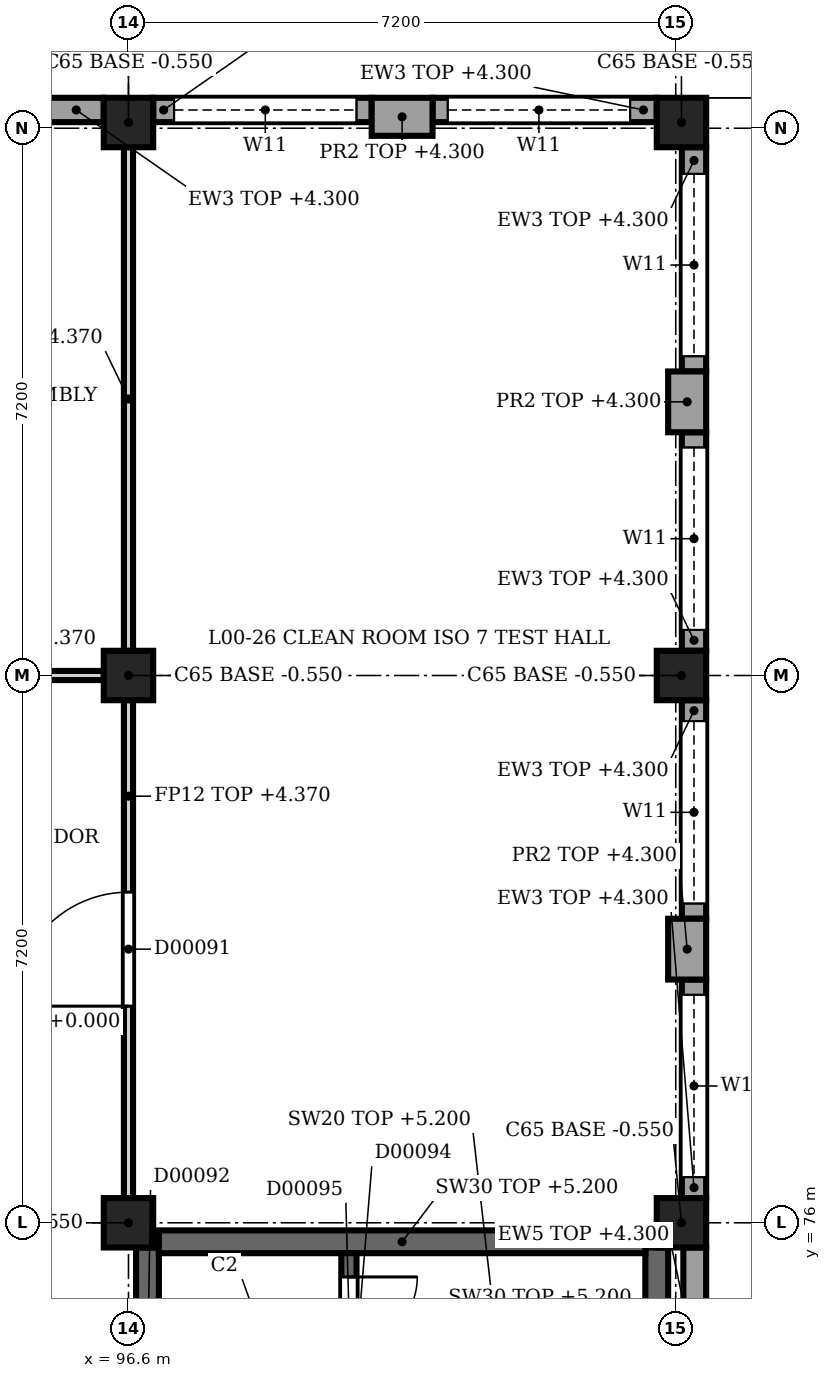
"""IFC4 building model, lengths in metres.
Left out: names, types, materials, properties, quantities, classifications, styles, units other than length and angle.
Written with IfcOpenShell. Run it as: python <this file> out.ifc"""

import sys

from ifc_helpers import new_model, si_unit, direction, frame, frame_2d, origin, origin_2d, place, context, subcontext, project, spatial, rectangle, extrude, element, fill, save


model = new_model("IFC4")
c1 = context("Model", 3, precision=1e-05, world=origin(), true_north=direction((0.0, 1.0)))
c2 = subcontext(c1, "Body", "Model", "MODEL_VIEW")
j1 = project(units=[si_unit("LENGTHUNIT", "METRE"), si_unit("PLANEANGLEUNIT", "RADIAN")], contexts=[c1])
p1 = place(None, origin())
s1 = spatial("IfcSite", under=j1, at=p1, CompositionType="ELEMENT")
p2 = place(p1, origin())
s2 = spatial("IfcBuilding", under=s1, at=p2, CompositionType="ELEMENT")
p3 = place(p2, origin())
s3 = spatial("IfcBuildingStorey", under=s2, at=p3, CompositionType="ELEMENT", Elevation=0.0)
for number, where, z_axis, x_axis in (
    (1, (96.6, 76.0, -0.55), (0.0, 0.0, 1.0), (1.0, 0.0, 0.0)),
    (2, (96.6, 83.2, -0.55), (0.0, 0.0, 1.0), (1.0, 0.0, 0.0)),
    (3, (96.6, 90.475, -0.55), (0.0, 0.0, 1.0), (1.0, 0.0, 0.0)),
    (4, (103.875, 76.0, -0.55), (0.0, 0.0, 1.0), (1.0, 0.0, 0.0)),
    (5, (103.875, 83.2, -0.55), (0.0, 0.0, 1.0), (1.0, 0.0, 0.0)),
    (6, (103.875, 90.475, -0.55), (0.0, 0.0, 1.0), (1.0, 0.0, 0.0)),
):
    element("IfcColumn", number, at=place(p3, frame(where, z_axis=z_axis, x_axis=x_axis)), inside=s3, PredefinedType="COLUMN", context=c2, shape_type="SweptSolid", body=[
        extrude(rectangle(XDim=0.65, YDim=0.65, at=origin_2d()), origin(), (0.0, 0.0, 1.0), 5.95),
    ])
p4 = place(p3, frame((99.8, 90.55, 0.0), z_axis=(0.0, 0.0, 1.0), x_axis=(1.0, 0.0, 0.0)))
e7 = element("IfcWall", 7, at=p4, inside=s3, PredefinedType="SOLIDWALL", context=c2, shape_type="SweptSolid", body=[
    extrude(rectangle(XDim=0.8, YDim=0.5, at=frame_2d((0.4, 0.0))), origin(), (0.0, 0.0, 1.0), 4.3),
])
p5 = place(p3, frame((93.4, 90.64, 0.0), z_axis=(0.0, 0.0, 1.0), x_axis=(1.0, 0.0, 0.0)))
e8 = element("IfcWall", 8, at=p5, inside=s3, PredefinedType="SOLIDWALL", context=c2, shape_type="SweptSolid", body=[
    extrude(rectangle(XDim=2.875, YDim=0.32, at=frame_2d((1.438, 0.0))), origin(), (0.0, 0.0, 1.0), 4.3),
])
p6 = place(p5, frame((0.65, 0.0, 0.0)))
e9 = element("IfcOpeningElement", 9, at=p6, cuts=e8, PredefinedType="OPENING", context=c2, shape_type="SweptSolid", body=[
    extrude(rectangle(XDim=1.5, YDim=2.3, at=frame_2d((0.75, 1.15))), frame((0.0, 0.17, 0.0), z_axis=(0.0, -1.0, 0.0), x_axis=(1.0, 0.0, 0.0)), (0.0, 0.0, 1.0), 0.34),
])
p7 = place(p3, frame((96.925, 90.64, 0.0), z_axis=(0.0, 0.0, 1.0), x_axis=(1.0, 0.0, 0.0)))
e10 = element("IfcWall", 10, at=p7, inside=s3, PredefinedType="SOLIDWALL", context=c2, shape_type="SweptSolid", body=[
    extrude(rectangle(XDim=2.875, YDim=0.32, at=frame_2d((1.438, 0.0))), origin(), (0.0, 0.0, 1.0), 4.3),
])
p8 = place(p7, frame((0.275, 0.0, 2.2)))
e11 = element("IfcOpeningElement", 11, at=p8, cuts=e10, PredefinedType="OPENING", context=c2, shape_type="SweptSolid", body=[
    extrude(rectangle(XDim=2.4, YDim=0.9, at=frame_2d((1.2, 0.45))), frame((0.0, 0.17, 0.0), z_axis=(0.0, -1.0, 0.0), x_axis=(1.0, 0.0, 0.0)), (0.0, 0.0, 1.0), 0.34),
])
p9 = place(p3, frame((100.6, 90.64, 0.0), z_axis=(0.0, 0.0, 1.0), x_axis=(1.0, 0.0, 0.0)))
e12 = element("IfcWall", 12, at=p9, inside=s3, PredefinedType="SOLIDWALL", context=c2, shape_type="SweptSolid", body=[
    extrude(rectangle(XDim=2.95, YDim=0.32, at=frame_2d((1.475, 0.0))), origin(), (0.0, 0.0, 1.0), 4.3),
])
p10 = place(p9, frame((0.2, 0.0, 2.2)))
e13 = element("IfcOpeningElement", 13, at=p10, cuts=e12, PredefinedType="OPENING", context=c2, shape_type="SweptSolid", body=[
    extrude(rectangle(XDim=2.4, YDim=0.9, at=frame_2d((1.2, 0.45))), frame((0.0, 0.17, 0.0), z_axis=(0.0, -1.0, 0.0), x_axis=(1.0, 0.0, 0.0)), (0.0, 0.0, 1.0), 0.34),
])
for number, where, z_axis, x_axis in (
    (14, (103.95, 87.2, 0.0), (0.0, 0.0, 1.0), (0.0, -1.0, 0.0)),
    (15, (103.95, 80.0, 0.0), (0.0, 0.0, 1.0), (0.0, -1.0, 0.0)),
):
    element("IfcWall", number, at=place(p3, frame(where, z_axis=z_axis, x_axis=x_axis)), inside=s3, PredefinedType="SOLIDWALL", context=c2, shape_type="SweptSolid", body=[
        extrude(rectangle(XDim=0.8, YDim=0.5, at=frame_2d((0.4, 0.0))), origin(), (0.0, 0.0, 1.0), 4.3),
    ])
p11 = place(p3, frame((104.04, 90.15, 0.0), z_axis=(0.0, 0.0, 1.0), x_axis=(0.0, -1.0, 0.0)))
e16 = element("IfcWall", 16, at=p11, inside=s3, PredefinedType="SOLIDWALL", context=c2, shape_type="SweptSolid", body=[
    extrude(rectangle(XDim=2.95, YDim=0.32, at=frame_2d((1.475, 0.0))), origin(), (0.0, 0.0, 1.0), 4.3),
])
p12 = place(p11, frame((0.35, 0.0, 2.2)))
e17 = element("IfcOpeningElement", 17, at=p12, cuts=e16, PredefinedType="OPENING", context=c2, shape_type="SweptSolid", body=[
    extrude(rectangle(XDim=2.4, YDim=0.9, at=frame_2d((1.2, 0.45))), frame((0.0, 0.17, 0.0), z_axis=(0.0, -1.0, 0.0), x_axis=(1.0, 0.0, 0.0)), (0.0, 0.0, 1.0), 0.34),
])
p13 = place(p3, frame((104.04, 86.4, 0.0), z_axis=(0.0, 0.0, 1.0), x_axis=(0.0, -1.0, 0.0)))
e18 = element("IfcWall", 18, at=p13, inside=s3, PredefinedType="SOLIDWALL", context=c2, shape_type="SweptSolid", body=[
    extrude(rectangle(XDim=2.875, YDim=0.32, at=frame_2d((1.438, 0.0))), origin(), (0.0, 0.0, 1.0), 4.3),
])
p14 = place(p13, frame((0.2, 0.0, 2.2)))
e19 = element("IfcOpeningElement", 19, at=p14, cuts=e18, PredefinedType="OPENING", context=c2, shape_type="SweptSolid", body=[
    extrude(rectangle(XDim=2.4, YDim=0.9, at=frame_2d((1.2, 0.45))), frame((0.0, 0.17, 0.0), z_axis=(0.0, -1.0, 0.0), x_axis=(1.0, 0.0, 0.0)), (0.0, 0.0, 1.0), 0.34),
])
p15 = place(p3, frame((104.04, 82.875, 0.0), z_axis=(0.0, 0.0, 1.0), x_axis=(0.0, -1.0, 0.0)))
e20 = element("IfcWall", 20, at=p15, inside=s3, PredefinedType="SOLIDWALL", context=c2, shape_type="SweptSolid", body=[
    extrude(rectangle(XDim=2.875, YDim=0.32, at=frame_2d((1.438, 0.0))), origin(), (0.0, 0.0, 1.0), 4.3),
])
p16 = place(p15, frame((0.275, 0.0, 2.2)))
e21 = element("IfcOpeningElement", 21, at=p16, cuts=e20, PredefinedType="OPENING", context=c2, shape_type="SweptSolid", body=[
    extrude(rectangle(XDim=2.4, YDim=0.9, at=frame_2d((1.2, 0.45))), frame((0.0, 0.17, 0.0), z_axis=(0.0, -1.0, 0.0), x_axis=(1.0, 0.0, 0.0)), (0.0, 0.0, 1.0), 0.34),
])
p17 = place(p3, frame((104.04, 79.2, 0.0), z_axis=(0.0, 0.0, 1.0), x_axis=(0.0, -1.0, 0.0)))
e22 = element("IfcWall", 22, at=p17, inside=s3, PredefinedType="SOLIDWALL", context=c2, shape_type="SweptSolid", body=[
    extrude(rectangle(XDim=2.875, YDim=0.32, at=frame_2d((1.438, 0.0))), origin(), (0.0, 0.0, 1.0), 4.3),
])
p18 = place(p17, frame((0.2, 0.0, 2.2)))
e23 = element("IfcOpeningElement", 23, at=p18, cuts=e22, PredefinedType="OPENING", context=c2, shape_type="SweptSolid", body=[
    extrude(rectangle(XDim=2.4, YDim=0.9, at=frame_2d((1.2, 0.45))), frame((0.0, 0.17, 0.0), z_axis=(0.0, -1.0, 0.0), x_axis=(1.0, 0.0, 0.0)), (0.0, 0.0, 1.0), 0.34),
])
p19 = place(p3, frame((104.05, 75.675, 0.0), z_axis=(0.0, 0.0, 1.0), x_axis=(0.0, -1.0, 0.0)))
e24 = element("IfcWall", 24, at=p19, inside=s3, PredefinedType="SOLIDWALL", context=c2, shape_type="SweptSolid", body=[
    extrude(rectangle(XDim=2.875, YDim=0.3, at=frame_2d((1.438, 0.0))), origin(), (0.0, 0.0, 1.0), 4.3),
])
p20 = place(p3, frame((96.85, 75.675, 0.0), z_axis=(0.0, 0.0, 1.0), x_axis=(0.0, -1.0, 0.0)))
e25 = element("IfcWall", 25, at=p20, inside=s3, PredefinedType="SHEAR", context=c2, shape_type="SweptSolid", body=[
    extrude(rectangle(XDim=6.625, YDim=0.3, at=frame_2d((3.312, 0.0))), origin(), (0.0, 0.0, 1.0), 5.2),
])
p21 = place(p20, frame((1.075, 0.0, 0.0)))
e26 = element("IfcOpeningElement", 26, at=p21, cuts=e25, PredefinedType="OPENING", context=c2, shape_type="SweptSolid", body=[
    extrude(rectangle(XDim=1.2, YDim=2.1, at=frame_2d((0.6, 1.05))), frame((0.0, 0.16, 0.0), z_axis=(0.0, -1.0, 0.0), x_axis=(1.0, 0.0, 0.0)), (0.0, 0.0, 1.0), 0.32),
])
p22 = place(p3, frame((103.55, 69.05, 0.0), z_axis=(0.0, 0.0, 1.0), x_axis=(0.0, 1.0, 0.0)))
e27 = element("IfcWall", 27, at=p22, inside=s3, PredefinedType="SHEAR", context=c2, shape_type="SweptSolid", body=[
    extrude(rectangle(XDim=6.625, YDim=0.3, at=frame_2d((3.312, 0.0))), origin(), (0.0, 0.0, 1.0), 5.2),
])
p23 = place(p22, frame((1.0, 0.0, 0.0)))
e28 = element("IfcOpeningElement", 28, at=p23, cuts=e27, PredefinedType="OPENING", context=c2, shape_type="SweptSolid", body=[
    extrude(rectangle(XDim=1.1, YDim=2.1, at=frame_2d((0.55, 1.05))), frame((0.0, 0.16, 0.0), z_axis=(0.0, -1.0, 0.0), x_axis=(1.0, 0.0, 0.0)), (0.0, 0.0, 1.0), 0.32),
])
p24 = place(p3, frame((97.0, 75.75, 0.0), z_axis=(0.0, 0.0, 1.0), x_axis=(1.0, 0.0, 0.0)))
e29 = element("IfcWall", 29, at=p24, inside=s3, PredefinedType="SHEAR", context=c2, shape_type="SweptSolid", body=[
    extrude(rectangle(XDim=6.4, YDim=0.3, at=frame_2d((3.2, 0.0))), origin(), (0.0, 0.0, 1.0), 5.2),
])
p25 = place(p3, frame((99.5, 72.35, 0.0), z_axis=(0.0, 0.0, 1.0), x_axis=(0.0, 1.0, 0.0)))
e30 = element("IfcWall", 30, at=p25, inside=s3, PredefinedType="SHEAR", context=c2, shape_type="SweptSolid", body=[
    extrude(rectangle(XDim=3.25, YDim=0.2, at=frame_2d((1.625, 0.0))), origin(), (0.0, 0.0, 1.0), 5.2),
])
p26 = place(p25, frame((0.312, 0.0, 0.0)))
e31 = element("IfcOpeningElement", 31, at=p26, cuts=e30, PredefinedType="OPENING", context=c2, shape_type="SweptSolid", body=[
    extrude(rectangle(XDim=0.9, YDim=2.1, at=frame_2d((0.45, 1.05))), frame((0.0, 0.11, 0.0), z_axis=(0.0, -1.0, 0.0), x_axis=(1.0, 0.0, 0.0)), (0.0, 0.0, 1.0), 0.22),
])
p27 = place(p25, frame((2.038, 0.0, 0.0)))
e32 = element("IfcOpeningElement", 32, at=p27, cuts=e30, PredefinedType="OPENING", context=c2, shape_type="SweptSolid", body=[
    extrude(rectangle(XDim=0.9, YDim=2.1, at=frame_2d((0.45, 1.05))), frame((0.0, 0.11, 0.0), z_axis=(0.0, -1.0, 0.0), x_axis=(1.0, 0.0, 0.0)), (0.0, 0.0, 1.0), 0.22),
])
p28 = place(p3, frame((89.725, 83.2, 0.0), z_axis=(0.0, 0.0, 1.0), x_axis=(1.0, 0.0, 0.0)))
e33 = element("IfcWall", 33, at=p28, inside=s3, PredefinedType="PARTITIONING", context=c2, shape_type="SweptSolid", body=[
    extrude(rectangle(XDim=6.55, YDim=0.12, at=frame_2d((3.275, 0.0))), origin(), (0.0, 0.0, 1.0), 4.37),
])
p29 = place(p28, frame((2.525, 0.0, 0.0)))
e34 = element("IfcOpeningElement", 34, at=p29, cuts=e33, PredefinedType="OPENING", context=c2, shape_type="SweptSolid", body=[
    extrude(rectangle(XDim=1.5, YDim=2.2, at=frame_2d((0.75, 1.1))), frame((0.0, 0.07, 0.0), z_axis=(0.0, -1.0, 0.0), x_axis=(1.0, 0.0, 0.0)), (0.0, 0.0, 1.0), 0.14),
])
p30 = place(p3, frame((96.6, 82.875, 0.0), z_axis=(0.0, 0.0, 1.0), x_axis=(0.0, -1.0, 0.0)))
e35 = element("IfcWall", 35, at=p30, inside=s3, PredefinedType="PARTITIONING", context=c2, shape_type="SweptSolid", body=[
    extrude(rectangle(XDim=6.55, YDim=0.12, at=frame_2d((3.275, 0.0))), origin(), (0.0, 0.0, 1.0), 4.37),
])
p31 = place(p30, frame((2.525, 0.0, 0.0)))
e36 = element("IfcOpeningElement", 36, at=p31, cuts=e35, PredefinedType="OPENING", context=c2, shape_type="SweptSolid", body=[
    extrude(rectangle(XDim=1.5, YDim=2.2, at=frame_2d((0.75, 1.1))), frame((0.0, 0.07, 0.0), z_axis=(0.0, -1.0, 0.0), x_axis=(1.0, 0.0, 0.0)), (0.0, 0.0, 1.0), 0.14),
])
p32 = place(p3, frame((96.6, 83.525, 0.0), z_axis=(0.0, 0.0, 1.0), x_axis=(0.0, 1.0, 0.0)))
e37 = element("IfcWall", 37, at=p32, inside=s3, PredefinedType="PARTITIONING", context=c2, shape_type="SweptSolid", body=[
    extrude(rectangle(XDim=6.625, YDim=0.12, at=frame_2d((3.312, 0.0))), origin(), (0.0, 0.0, 1.0), 4.37),
])
p33 = place(p8, origin())
e38 = element("IfcWindow", 38, at=p33, inside=s3, PartitioningType="SINGLE_PANEL", PredefinedType="WINDOW", context=c2, shape_type="SweptSolid", body=[
    extrude(rectangle(XDim=2.4, YDim=0.9, at=frame_2d((1.2, 0.45))), frame((0.0, 0.03, 0.0), z_axis=(0.0, -1.0, 0.0), x_axis=(1.0, 0.0, 0.0)), (0.0, 0.0, 1.0), 0.06),
])
fill(e11, e38)
p34 = place(p10, origin())
e39 = element("IfcWindow", 39, at=p34, inside=s3, PartitioningType="SINGLE_PANEL", PredefinedType="WINDOW", context=c2, shape_type="SweptSolid", body=[
    extrude(rectangle(XDim=2.4, YDim=0.9, at=frame_2d((1.2, 0.45))), frame((0.0, 0.03, 0.0), z_axis=(0.0, -1.0, 0.0), x_axis=(1.0, 0.0, 0.0)), (0.0, 0.0, 1.0), 0.06),
])
fill(e13, e39)
p35 = place(p12, origin())
e40 = element("IfcWindow", 40, at=p35, inside=s3, PartitioningType="SINGLE_PANEL", PredefinedType="WINDOW", context=c2, shape_type="SweptSolid", body=[
    extrude(rectangle(XDim=2.4, YDim=0.9, at=frame_2d((1.2, 0.45))), frame((0.0, 0.03, 0.0), z_axis=(0.0, -1.0, 0.0), x_axis=(1.0, 0.0, 0.0)), (0.0, 0.0, 1.0), 0.06),
])
fill(e17, e40)
p36 = place(p14, origin())
e41 = element("IfcWindow", 41, at=p36, inside=s3, PartitioningType="SINGLE_PANEL", PredefinedType="WINDOW", context=c2, shape_type="SweptSolid", body=[
    extrude(rectangle(XDim=2.4, YDim=0.9, at=frame_2d((1.2, 0.45))), frame((0.0, 0.03, 0.0), z_axis=(0.0, -1.0, 0.0), x_axis=(1.0, 0.0, 0.0)), (0.0, 0.0, 1.0), 0.06),
])
fill(e19, e41)
p37 = place(p16, origin())
e42 = element("IfcWindow", 42, at=p37, inside=s3, PartitioningType="SINGLE_PANEL", PredefinedType="WINDOW", context=c2, shape_type="SweptSolid", body=[
    extrude(rectangle(XDim=2.4, YDim=0.9, at=frame_2d((1.2, 0.45))), frame((0.0, 0.03, 0.0), z_axis=(0.0, -1.0, 0.0), x_axis=(1.0, 0.0, 0.0)), (0.0, 0.0, 1.0), 0.06),
])
fill(e21, e42)
p38 = place(p18, origin())
e43 = element("IfcWindow", 43, at=p38, inside=s3, PartitioningType="SINGLE_PANEL", PredefinedType="WINDOW", context=c2, shape_type="SweptSolid", body=[
    extrude(rectangle(XDim=2.4, YDim=0.9, at=frame_2d((1.2, 0.45))), frame((0.0, 0.03, 0.0), z_axis=(0.0, -1.0, 0.0), x_axis=(1.0, 0.0, 0.0)), (0.0, 0.0, 1.0), 0.06),
])
fill(e23, e43)
p39 = place(p27, origin())
e44 = element("IfcDoor", 44, at=p39, inside=s3, OperationType="SINGLE_SWING_RIGHT", PredefinedType="DOOR", context=c2, shape_type="SweptSolid", body=[
    extrude(rectangle(XDim=0.9, YDim=2.1, at=frame_2d((0.45, 1.05))), frame((0.0, 0.025, 0.0), z_axis=(0.0, -1.0, 0.0), x_axis=(1.0, 0.0, 0.0)), (0.0, 0.0, 1.0), 0.05),
])
fill(e32, e44)
p40 = place(p31, origin())
e45 = element("IfcDoor", 45, at=p40, inside=s3, OperationType="SINGLE_SWING_RIGHT", PredefinedType="DOOR", context=c2, shape_type="SweptSolid", body=[
    extrude(rectangle(XDim=1.5, YDim=2.2, at=frame_2d((0.75, 1.1))), frame((0.0, 0.025, 0.0), z_axis=(0.0, -1.0, 0.0), x_axis=(1.0, 0.0, 0.0)), (0.0, 0.0, 1.0), 0.05),
])
fill(e36, e45)
save(model, sys.argv[1])
